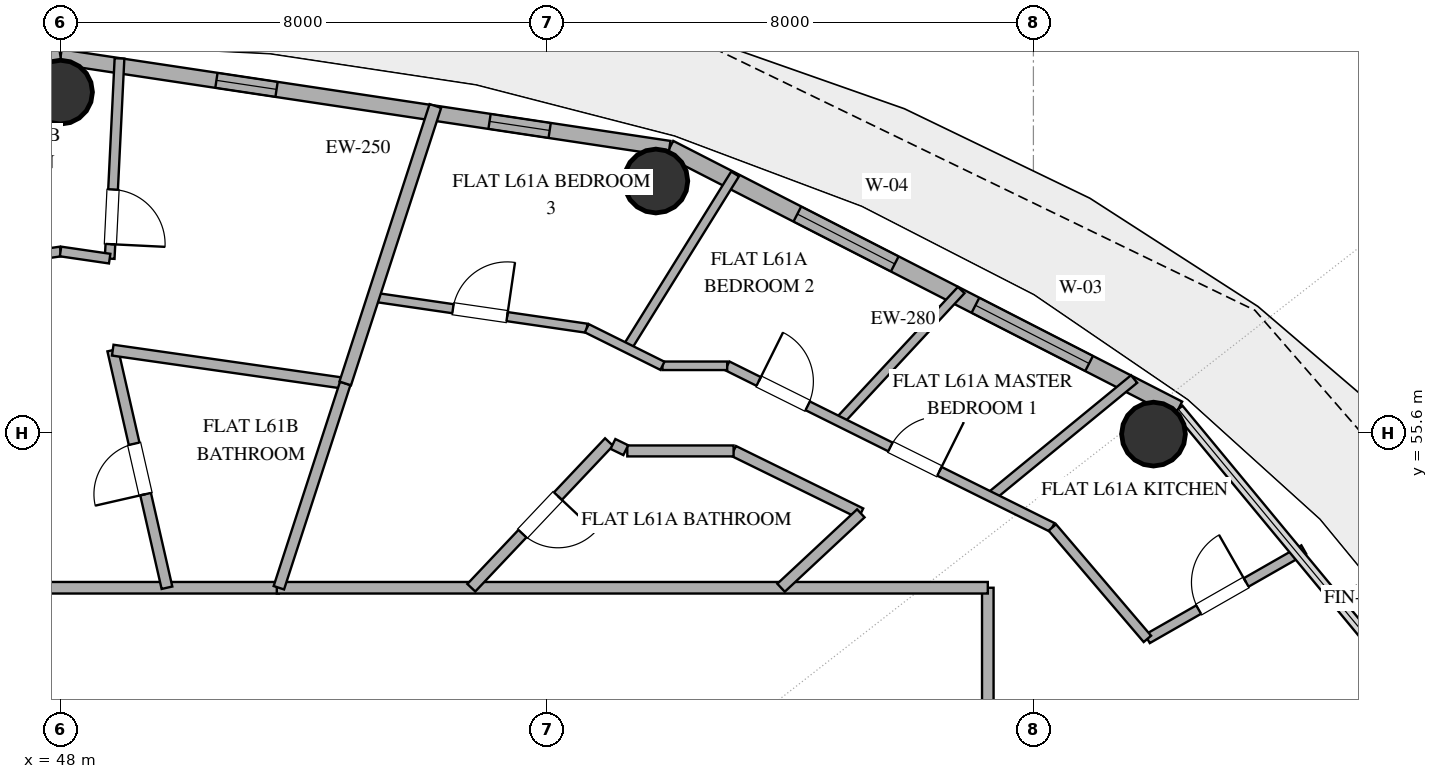
"""IFC4 building model, lengths in metres.
Left out: names, types, materials, properties, quantities, classifications, styles, units other than length and angle.
Written with IfcOpenShell. Run it as: python <this file> out.ifc"""

import sys

from ifc_helpers import new_model, si_unit, direction, frame, frame_2d, origin, origin_2d, place, context, subcontext, project, spatial, rectangle, hollow_circle, extrude, element, fill, save


model = new_model("IFC4")
c1 = context("Model", 3, precision=1e-05, world=origin(), true_north=direction((0.0, 1.0)))
c2 = subcontext(c1, "Body", "Model", "MODEL_VIEW")
j1 = project(units=[si_unit("LENGTHUNIT", "METRE"), si_unit("PLANEANGLEUNIT", "RADIAN")], contexts=[c1])
p1 = place(None, origin())
s1 = spatial("IfcSite", under=j1, at=p1, CompositionType="ELEMENT")
p2 = place(p1, origin())
s2 = spatial("IfcBuilding", under=s1, at=p2, CompositionType="ELEMENT")
p3 = place(p2, frame((0.0, 0.0, 238.8)))
s3 = spatial("IfcBuildingStorey", under=s2, at=p3, CompositionType="ELEMENT", Elevation=238.8)
for number, where, z_axis, x_axis in (
    (1, (65.975, 55.576, 0.0), (0.0, 0.0, 1.0), (1.0, 0.0, 0.0)),
    (2, (57.791, 59.739, 0.0), (0.0, 0.0, 1.0), (1.0, 0.0, 0.0)),
    (3, (48.0, 61.2, 0.0), (0.0, 0.0, 1.0), (1.0, 0.0, 0.0)),
):
    element("IfcColumn", number, at=place(p3, frame(where, z_axis=z_axis, x_axis=x_axis)), inside=s3, PredefinedType="COLUMN", context=c2, shape_type="SweptSolid", body=[
        extrude(hollow_circle(Radius=0.525, WallThickness=0.028, at=origin_2d()), origin(), (0.0, 0.0, 1.0), 3.36),
    ])
p4 = place(p3, frame((66.383, 55.987, 0.0), z_axis=(0.0, 0.0, 1.0), x_axis=(-0.890007394051, 0.455946091699, 0.0)))
e4 = element("IfcWall", 4, at=p4, inside=s3, PredefinedType="SOLIDWALL", context=c2, shape_type="SweptSolid", body=[
    extrude(rectangle(XDim=9.404, YDim=0.28, at=frame_2d((4.702, 0.0))), origin(), (0.0, 0.0, 1.0), 3.36),
])
p5 = place(p4, frame((1.648, 0.0, 0.85)))
e5 = element("IfcOpeningElement", 5, at=p5, cuts=e4, PredefinedType="OPENING", context=c2, shape_type="SweptSolid", body=[
    extrude(rectangle(XDim=2.1, YDim=2.2, at=frame_2d((1.05, 1.1))), frame((0.0, 0.15, 0.0), z_axis=(0.0, -1.0, 0.0), x_axis=(1.0, 0.0, 0.0)), (0.0, 0.0, 1.0), 0.3),
])
p6 = place(p4, frame((5.239, 0.0, 0.85)))
e6 = element("IfcOpeningElement", 6, at=p6, cuts=e4, PredefinedType="OPENING", context=c2, shape_type="SweptSolid", body=[
    extrude(rectangle(XDim=1.8, YDim=2.2, at=frame_2d((0.9, 1.1))), frame((0.0, 0.15, 0.0), z_axis=(0.0, -1.0, 0.0), x_axis=(1.0, 0.0, 0.0)), (0.0, 0.0, 1.0), 0.3),
])
p7 = place(p3, frame((58.013, 60.274, 0.0), z_axis=(0.0, 0.0, 1.0), x_axis=(-0.988882522213, 0.148698881169, 0.0)))
e7 = element("IfcWall", 7, at=p7, inside=s3, PredefinedType="SOLIDWALL", context=c2, shape_type="SweptSolid", body=[
    extrude(rectangle(XDim=10.125, YDim=0.25, at=frame_2d((5.062, 0.0))), origin(), (0.0, 0.0, 1.0), 3.36),
])
p8 = place(p7, frame((1.99, 0.0, 0.35)))
e8 = element("IfcOpeningElement", 8, at=p8, cuts=e7, PredefinedType="OPENING", context=c2, shape_type="SweptSolid", body=[
    extrude(rectangle(XDim=1.0, YDim=1.05, at=frame_2d((0.5, 0.525))), frame((0.0, 0.135, 0.0), z_axis=(0.0, -1.0, 0.0), x_axis=(1.0, 0.0, 0.0)), (0.0, 0.0, 1.0), 0.27),
])
p9 = place(p7, frame((6.533, 0.0, 1.42)))
e9 = element("IfcOpeningElement", 9, at=p9, cuts=e7, PredefinedType="OPENING", context=c2, shape_type="SweptSolid", body=[
    extrude(rectangle(XDim=1.0, YDim=1.05, at=frame_2d((0.5, 0.525))), frame((0.0, 0.135, 0.0), z_axis=(0.0, -1.0, 0.0), x_axis=(1.0, 0.0, 0.0)), (0.0, 0.0, 1.0), 0.27),
])
p10 = place(p3, frame((48.0, 61.78, 0.0), z_axis=(0.0, 0.0, 1.0), x_axis=(-0.988882522213, -0.148698881169, 0.0)))
e10 = element("IfcWall", 10, at=p10, inside=s3, PredefinedType="SOLIDWALL", context=c2, shape_type="SweptSolid", body=[
    extrude(rectangle(XDim=10.125, YDim=0.28, at=frame_2d((5.062, 0.0))), origin(), (0.0, 0.0, 1.0), 3.36),
])
p11 = place(p10, frame((2.694, 0.0, 0.85)))
e11 = element("IfcOpeningElement", 11, at=p11, cuts=e10, PredefinedType="OPENING", context=c2, shape_type="SweptSolid", body=[
    extrude(rectangle(XDim=1.65, YDim=2.0, at=frame_2d((0.825, 1.0))), frame((0.0, 0.15, 0.0), z_axis=(0.0, -1.0, 0.0), x_axis=(1.0, 0.0, 0.0)), (0.0, 0.0, 1.0), 0.3),
])
p12 = place(p10, frame((7.23, 0.0, 0.0)))
e12 = element("IfcOpeningElement", 12, at=p12, cuts=e10, PredefinedType="OPENING", context=c2, shape_type="SweptSolid", body=[
    extrude(rectangle(XDim=1.1, YDim=2.25, at=frame_2d((0.55, 1.125))), frame((0.0, 0.15, 0.0), z_axis=(0.0, -1.0, 0.0), x_axis=(1.0, 0.0, 0.0)), (0.0, 0.0, 1.0), 0.3),
])
p13 = place(p3, frame((32.75, 53.05, 0.0), z_axis=(0.0, 0.0, 1.0), x_axis=(1.0, 0.0, 0.0)))
e13 = element("IfcWall", 13, at=p13, inside=s3, PredefinedType="PARTITIONING", context=c2, shape_type="SweptSolid", body=[
    extrude(rectangle(XDim=18.84, YDim=0.19, at=frame_2d((9.42, 0.0))), origin(), (0.0, 0.0, 1.0), 2.72),
])
p14 = place(p13, frame((11.305, 0.0, 0.0)))
e14 = element("IfcOpeningElement", 14, at=p14, cuts=e13, PredefinedType="OPENING", context=c2, shape_type="SweptSolid", body=[
    extrude(rectangle(XDim=1.0, YDim=2.2, at=frame_2d((0.5, 1.1))), frame((0.0, 0.105, 0.0), z_axis=(0.0, -1.0, 0.0), x_axis=(1.0, 0.0, 0.0)), (0.0, 0.0, 1.0), 0.21),
])
p15 = place(p13, frame((2.829, 0.0, 0.0)))
e15 = element("IfcOpeningElement", 15, at=p15, cuts=e13, PredefinedType="OPENING", context=c2, shape_type="SweptSolid", body=[
    extrude(rectangle(XDim=1.0, YDim=2.2, at=frame_2d((0.5, 1.1))), frame((0.0, 0.105, 0.0), z_axis=(0.0, -1.0, 0.0), x_axis=(1.0, 0.0, 0.0)), (0.0, 0.0, 1.0), 0.21),
])
p16 = place(p3, frame((63.25, 53.05, 0.0), z_axis=(0.0, 0.0, 1.0), x_axis=(0.0, -1.0, 0.0)))
e16 = element("IfcWall", 16, at=p16, inside=s3, PredefinedType="PARTITIONING", context=c2, shape_type="SweptSolid", body=[
    extrude(rectangle(XDim=16.335, YDim=0.19, at=frame_2d((8.167, 0.0))), origin(), (0.0, 0.0, 1.0), 2.72),
])
p17 = place(p16, frame((3.14, 0.0, 0.0)))
e17 = element("IfcOpeningElement", 17, at=p17, cuts=e16, PredefinedType="OPENING", context=c2, shape_type="SweptSolid", body=[
    extrude(rectangle(XDim=1.0, YDim=2.2, at=frame_2d((0.5, 1.1))), frame((0.0, 0.105, 0.0), z_axis=(0.0, -1.0, 0.0), x_axis=(1.0, 0.0, 0.0)), (0.0, 0.0, 1.0), 0.21),
])
p18 = place(p16, frame((10.111, 0.0, 0.0)))
e18 = element("IfcOpeningElement", 18, at=p18, cuts=e16, PredefinedType="OPENING", context=c2, shape_type="SweptSolid", body=[
    extrude(rectangle(XDim=1.0, YDim=2.2, at=frame_2d((0.5, 1.1))), frame((0.0, 0.105, 0.0), z_axis=(0.0, -1.0, 0.0), x_axis=(1.0, 0.0, 0.0)), (0.0, 0.0, 1.0), 0.21),
])
p19 = place(p3, frame((51.557, 53.05, 0.0), z_axis=(0.0, 0.0, 1.0), x_axis=(1.0, 0.0, 0.0)))
e19 = element("IfcWall", 19, at=p19, inside=s3, PredefinedType="PARTITIONING", context=c2, shape_type="SweptSolid", body=[
    extrude(rectangle(XDim=11.693, YDim=0.19, at=frame_2d((5.847, 0.0))), origin(), (0.0, 0.0, 1.0), 2.72),
])
p20 = place(p3, frame((49.75, 53.05, 0.0), z_axis=(0.0, 0.0, 1.0), x_axis=(-0.222474116201, 0.974938596846, 0.0)))
e20 = element("IfcWall", 20, at=p20, inside=s3, PredefinedType="PLUMBINGWALL", context=c2, shape_type="SweptSolid", body=[
    extrude(rectangle(XDim=4.008, YDim=0.18, at=frame_2d((2.004, 0.0))), origin(), (0.0, 0.0, 1.0), 2.72),
])
p21 = place(p20, frame((1.579, 0.0, 0.0)))
e21 = element("IfcOpeningElement", 21, at=p21, cuts=e20, PredefinedType="OPENING", context=c2, shape_type="SweptSolid", body=[
    extrude(rectangle(XDim=0.85, YDim=2.1, at=frame_2d((0.425, 1.05))), frame((0.0, 0.1, 0.0), z_axis=(0.0, -1.0, 0.0), x_axis=(1.0, 0.0, 0.0)), (0.0, 0.0, 1.0), 0.2),
])
p22 = place(p3, frame((48.859, 56.957, 0.0), z_axis=(0.0, 0.0, 1.0), x_axis=(0.989916598229, -0.141651433282, 0.0)))
e22 = element("IfcWall", 22, at=p22, inside=s3, PredefinedType="PLUMBINGWALL", context=c2, shape_type="SweptSolid", body=[
    extrude(rectangle(XDim=3.863, YDim=0.18, at=frame_2d((1.931, 0.0))), origin(), (0.0, 0.0, 1.0), 2.72),
])
p23 = place(p3, frame((53.144, 57.83, 0.0), z_axis=(0.0, 0.0, 1.0), x_axis=(0.98952683964, -0.144348999414, 0.0)))
e23 = element("IfcWall", 23, at=p23, inside=s3, PredefinedType="PARTITIONING", context=c2, shape_type="SweptSolid", body=[
    extrude(rectangle(XDim=3.548, YDim=0.15, at=frame_2d((1.774, 0.0))), origin(), (0.0, 0.0, 1.0), 2.72),
])
p24 = place(p23, frame((1.324, 0.0, 0.0)))
e24 = element("IfcOpeningElement", 24, at=p24, cuts=e23, PredefinedType="OPENING", context=c2, shape_type="SweptSolid", body=[
    extrude(rectangle(XDim=0.9, YDim=2.1, at=frame_2d((0.45, 1.05))), frame((0.0, 0.085, 0.0), z_axis=(0.0, -1.0, 0.0), x_axis=(1.0, 0.0, 0.0)), (0.0, 0.0, 1.0), 0.17),
])
p25 = place(p3, frame((52.682, 56.41, 0.0), z_axis=(0.0, 0.0, 1.0), x_axis=(-0.309025133622, -0.951053871655, 0.0)))
e25 = element("IfcWall", 25, at=p25, inside=s3, PredefinedType="PLUMBINGWALL", context=c2, shape_type="SweptSolid", body=[
    extrude(rectangle(XDim=3.533, YDim=0.18, at=frame_2d((1.767, 0.0))), origin(), (0.0, 0.0, 1.0), 2.72),
])
p26 = place(p3, frame((57.314, 56.99, 0.0), z_axis=(0.0, 0.0, 1.0), x_axis=(0.527732275503, 0.849410763643, 0.0)))
e26 = element("IfcWall", 26, at=p26, inside=s3, PredefinedType="PARTITIONING", context=c2, shape_type="SweptSolid", body=[
    extrude(rectangle(XDim=3.372, YDim=0.15, at=frame_2d((1.686, 0.0))), origin(), (0.0, 0.0, 1.0), 2.72),
])
p27 = place(p3, frame((54.165, 60.973, 0.0), z_axis=(0.0, 0.0, 1.0), x_axis=(-0.309012424199, -0.951058001223, 0.0)))
e27 = element("IfcWall", 27, at=p27, inside=s3, PredefinedType="PARTITIONING", context=c2, shape_type="SweptSolid", body=[
    extrude(rectangle(XDim=4.797, YDim=0.2, at=frame_2d((2.399, 0.0))), origin(), (0.0, 0.0, 1.0), 2.72),
])
p28 = place(p3, frame((57.021, 55.446, 0.0), z_axis=(0.0, 0.0, 1.0), x_axis=(-0.686947406922, -0.726707135044, 0.0)))
e28 = element("IfcWall", 28, at=p28, inside=s3, PredefinedType="PLUMBINGWALL", context=c2, shape_type="SweptSolid", body=[
    extrude(rectangle(XDim=3.297, YDim=0.18, at=frame_2d((1.649, 0.0))), origin(), (0.0, 0.0, 1.0), 2.72),
])
p29 = place(p28, frame((1.224, 0.0, 0.0)))
e29 = element("IfcOpeningElement", 29, at=p29, cuts=e28, PredefinedType="OPENING", context=c2, shape_type="SweptSolid", body=[
    extrude(rectangle(XDim=0.85, YDim=2.1, at=frame_2d((0.425, 1.05))), frame((0.0, 0.1, 0.0), z_axis=(0.0, -1.0, 0.0), x_axis=(1.0, 0.0, 0.0)), (0.0, 0.0, 1.0), 0.2),
])
p30 = place(p3, frame((48.969, 61.755, 0.0), z_axis=(0.0, 0.0, 1.0), x_axis=(-0.04902528139, -0.998797537935, 0.0)))
e30 = element("IfcWall", 30, at=p30, inside=s3, PredefinedType="PLUMBINGWALL", context=c2, shape_type="SweptSolid", body=[
    extrude(rectangle(XDim=3.297, YDim=0.16, at=frame_2d((1.648, 0.0))), origin(), (0.0, 0.0, 1.0), 2.72),
])
p31 = place(p30, frame((2.158, 0.0, 0.0)))
e31 = element("IfcOpeningElement", 31, at=p31, cuts=e30, PredefinedType="OPENING", context=c2, shape_type="SweptSolid", body=[
    extrude(rectangle(XDim=0.9, YDim=2.1, at=frame_2d((0.45, 1.05))), frame((0.0, 0.09, 0.0), z_axis=(0.0, -1.0, 0.0), x_axis=(1.0, 0.0, 0.0)), (0.0, 0.0, 1.0), 0.18),
])
p32 = place(p3, frame((39.345, 57.318, 0.0), z_axis=(0.0, 0.0, 1.0), x_axis=(0.989540121389, 0.144257922351, 0.0)))
e32 = element("IfcWall", 32, at=p32, inside=s3, PredefinedType="PLUMBINGWALL", context=c2, shape_type="SweptSolid", body=[
    extrude(rectangle(XDim=8.746, YDim=0.16, at=frame_2d((4.373, 0.0))), origin(), (0.0, 0.0, 1.0), 2.72),
])
p33 = place(p32, frame((2.686, 0.0, 0.0)))
e33 = element("IfcOpeningElement", 33, at=p33, cuts=e32, PredefinedType="OPENING", context=c2, shape_type="SweptSolid", body=[
    extrude(rectangle(XDim=0.9, YDim=2.1, at=frame_2d((0.45, 1.05))), frame((0.0, 0.09, 0.0), z_axis=(0.0, -1.0, 0.0), x_axis=(1.0, 0.0, 0.0)), (0.0, 0.0, 1.0), 0.18),
])
p34 = place(p32, frame((5.349, 0.0, 0.0)))
e34 = element("IfcOpeningElement", 34, at=p34, cuts=e32, PredefinedType="OPENING", context=c2, shape_type="SweptSolid", body=[
    extrude(rectangle(XDim=0.9, YDim=2.1, at=frame_2d((0.45, 1.05))), frame((0.0, 0.09, 0.0), z_axis=(0.0, -1.0, 0.0), x_axis=(1.0, 0.0, 0.0)), (0.0, 0.0, 1.0), 0.18),
])
p35 = place(p32, frame((0.341, 0.0, 0.0)))
e35 = element("IfcOpeningElement", 35, at=p35, cuts=e32, PredefinedType="OPENING", context=c2, shape_type="SweptSolid", body=[
    extrude(rectangle(XDim=0.9, YDim=2.1, at=frame_2d((0.45, 1.05))), frame((0.0, 0.09, 0.0), z_axis=(0.0, -1.0, 0.0), x_axis=(1.0, 0.0, 0.0)), (0.0, 0.0, 1.0), 0.18),
])
p36 = place(p3, frame((63.296, 54.547, 0.0), z_axis=(0.0, 0.0, 1.0), x_axis=(0.773154828325, 0.634217321931, 0.0)))
e36 = element("IfcWall", 36, at=p36, inside=s3, PredefinedType="PLUMBINGWALL", context=c2, shape_type="SweptSolid", body=[
    extrude(rectangle(XDim=3.052, YDim=0.16, at=frame_2d((1.526, 0.0))), origin(), (0.0, 0.0, 1.0), 2.72),
])
p37 = place(p3, frame((65.875, 52.209, 0.0), z_axis=(0.0, 0.0, 1.0), x_axis=(0.868349640853, 0.495952519128, 0.0)))
e37 = element("IfcWall", 37, at=p37, inside=s3, PredefinedType="PLUMBINGWALL", context=c2, shape_type="SweptSolid", body=[
    extrude(rectangle(XDim=2.962, YDim=0.16, at=frame_2d((1.481, 0.0))), origin(), (0.0, 0.0, 1.0), 2.72),
])
p38 = place(p37, frame((0.971, 0.0, 0.0)))
e38 = element("IfcOpeningElement", 38, at=p38, cuts=e37, PredefinedType="OPENING", context=c2, shape_type="SweptSolid", body=[
    extrude(rectangle(XDim=0.9, YDim=2.1, at=frame_2d((0.45, 1.05))), frame((0.0, 0.09, 0.0), z_axis=(0.0, -1.0, 0.0), x_axis=(1.0, 0.0, 0.0)), (0.0, 0.0, 1.0), 0.18),
])
p39 = place(p3, frame((62.812, 57.945, 0.0), z_axis=(0.0, 0.0, 1.0), x_axis=(-0.680590804007, -0.732663741085, 0.0)))
e39 = element("IfcWall", 39, at=p39, inside=s3, PredefinedType="PARTITIONING", context=c2, shape_type="SweptSolid", body=[
    extrude(rectangle(XDim=2.949, YDim=0.15, at=frame_2d((1.475, 0.0))), origin(), (0.0, 0.0, 1.0), 2.72),
])
p40 = place(p3, frame((58.964, 56.7, 0.0), z_axis=(0.0, 0.0, 1.0), x_axis=(0.895471406875, -0.445119039661, 0.0)))
e40 = element("IfcWall", 40, at=p40, inside=s3, PredefinedType="PLUMBINGWALL", context=c2, shape_type="SweptSolid", body=[
    extrude(rectangle(XDim=5.971, YDim=0.16, at=frame_2d((2.986, 0.0))), origin(), (0.0, 0.0, 1.0), 2.72),
])
p41 = place(p40, frame((2.998, 0.0, 0.0)))
e41 = element("IfcOpeningElement", 41, at=p41, cuts=e40, PredefinedType="OPENING", context=c2, shape_type="SweptSolid", body=[
    extrude(rectangle(XDim=0.9, YDim=2.1, at=frame_2d((0.45, 1.05))), frame((0.0, 0.09, 0.0), z_axis=(0.0, -1.0, 0.0), x_axis=(1.0, 0.0, 0.0)), (0.0, 0.0, 1.0), 0.18),
])
p42 = place(p40, frame((0.578, 0.0, 0.0)))
e42 = element("IfcOpeningElement", 42, at=p42, cuts=e40, PredefinedType="OPENING", context=c2, shape_type="SweptSolid", body=[
    extrude(rectangle(XDim=0.9, YDim=2.1, at=frame_2d((0.45, 1.05))), frame((0.0, 0.09, 0.0), z_axis=(0.0, -1.0, 0.0), x_axis=(1.0, 0.0, 0.0)), (0.0, 0.0, 1.0), 0.18),
])
p43 = place(p3, frame((64.311, 54.042, 0.0), z_axis=(0.0, 0.0, 1.0), x_axis=(0.648953507232, -0.760828065631, 0.0)))
e43 = element("IfcWall", 43, at=p43, inside=s3, PredefinedType="PLUMBINGWALL", context=c2, shape_type="SweptSolid", body=[
    extrude(rectangle(XDim=2.409, YDim=0.16, at=frame_2d((1.205, 0.0))), origin(), (0.0, 0.0, 1.0), 2.72),
])
p44 = place(p3, frame((61.162, 54.273, 0.0), z_axis=(0.0, 0.0, 1.0), x_axis=(-0.897774561906, 0.440455259925, 0.0)))
e44 = element("IfcWall", 44, at=p44, inside=s3, PredefinedType="PLUMBINGWALL", context=c2, shape_type="SweptSolid", body=[
    extrude(rectangle(XDim=2.331, YDim=0.18, at=frame_2d((1.166, 0.0))), origin(), (0.0, 0.0, 1.0), 2.72),
])
p45 = place(p3, frame((59.85, 53.05, 0.0), z_axis=(0.0, 0.0, 1.0), x_axis=(0.731376514485, 0.681973895438, 0.0)))
e45 = element("IfcWall", 45, at=p45, inside=s3, PredefinedType="PLUMBINGWALL", context=c2, shape_type="SweptSolid", body=[
    extrude(rectangle(XDim=1.794, YDim=0.18, at=frame_2d((0.897, 0.0))), origin(), (0.0, 0.0, 1.0), 2.72),
])
p46 = place(p3, frame((59.069, 55.3, 0.0), z_axis=(0.0, 0.0, 1.0), x_axis=(-1.0, 0.0, 0.0)))
e46 = element("IfcWall", 46, at=p46, inside=s3, PredefinedType="PLUMBINGWALL", context=c2, shape_type="SweptSolid", body=[
    extrude(rectangle(XDim=1.748, YDim=0.18, at=frame_2d((0.874, 0.0))), origin(), (0.0, 0.0, 1.0), 2.72),
])
p47 = place(p3, frame((58.964, 56.7, 0.0), z_axis=(0.0, 0.0, 1.0), x_axis=(-1.0, 0.0, 0.0)))
e47 = element("IfcWall", 47, at=p47, inside=s3, PredefinedType="PARTITIONING", context=c2, shape_type="SweptSolid", body=[
    extrude(rectangle(XDim=1.065, YDim=0.14, at=frame_2d((0.533, 0.0))), origin(), (0.0, 0.0, 1.0), 2.72),
])
p48 = place(p3, frame((48.808, 58.462, 0.0), z_axis=(0.0, 0.0, 1.0), x_axis=(-0.989514290885, 0.144434996222, 0.0)))
e48 = element("IfcWall", 48, at=p48, inside=s3, PredefinedType="PLUMBINGWALL", context=c2, shape_type="SweptSolid", body=[
    extrude(rectangle(XDim=0.816, YDim=0.16, at=frame_2d((0.408, 0.0))), origin(), (0.0, 0.0, 1.0), 2.72),
])
p49 = place(p3, frame((56.655, 57.318, 0.0), z_axis=(0.0, 0.0, 1.0), x_axis=(0.895584310315, -0.444891833053, 0.0)))
e49 = element("IfcWall", 49, at=p49, inside=s3, PredefinedType="PARTITIONING", context=c2, shape_type="SweptSolid", body=[
    extrude(rectangle(XDim=1.389, YDim=0.15, at=frame_2d((0.694, 0.0))), origin(), (0.0, 0.0, 1.0), 2.72),
])
p50 = place(p3, frame((57.296, 55.312, 0.0), z_axis=(0.0, 0.0, 1.0), x_axis=(-0.898768445644, 0.438423632021, 0.0)))
e50 = element("IfcWall", 50, at=p50, inside=s3, PredefinedType="PLUMBINGWALL", context=c2, shape_type="SweptSolid", body=[
    extrude(rectangle(XDim=0.234, YDim=0.18, at=frame_2d((0.117, 0.0))), origin(), (0.0, 0.0, 1.0), 2.72),
])
p51 = place(p5, origin())
e51 = element("IfcWindow", 51, at=p51, inside=s3, PartitioningType="SINGLE_PANEL", PredefinedType="WINDOW", context=c2, shape_type="SweptSolid", body=[
    extrude(rectangle(XDim=2.1, YDim=2.2, at=frame_2d((1.05, 1.1))), frame((0.0, 0.03, 0.0), z_axis=(0.0, -1.0, 0.0), x_axis=(1.0, 0.0, 0.0)), (0.0, 0.0, 1.0), 0.06),
])
fill(e5, e51)
p52 = place(p6, origin())
e52 = element("IfcWindow", 52, at=p52, inside=s3, PartitioningType="SINGLE_PANEL", PredefinedType="WINDOW", context=c2, shape_type="SweptSolid", body=[
    extrude(rectangle(XDim=1.8, YDim=2.2, at=frame_2d((0.9, 1.1))), frame((0.0, 0.03, 0.0), z_axis=(0.0, -1.0, 0.0), x_axis=(1.0, 0.0, 0.0)), (0.0, 0.0, 1.0), 0.06),
])
fill(e6, e52)
p53 = place(p8, origin())
e53 = element("IfcWindow", 53, at=p53, inside=s3, PartitioningType="SINGLE_PANEL", PredefinedType="WINDOW", context=c2, shape_type="SweptSolid", body=[
    extrude(rectangle(XDim=1.0, YDim=1.05, at=frame_2d((0.5, 0.525))), frame((0.0, 0.03, 0.0), z_axis=(0.0, -1.0, 0.0), x_axis=(1.0, 0.0, 0.0)), (0.0, 0.0, 1.0), 0.06),
])
fill(e8, e53)
p54 = place(p9, origin())
e54 = element("IfcWindow", 54, at=p54, inside=s3, PartitioningType="SINGLE_PANEL", PredefinedType="WINDOW", context=c2, shape_type="SweptSolid", body=[
    extrude(rectangle(XDim=1.0, YDim=1.05, at=frame_2d((0.5, 0.525))), frame((0.0, 0.03, 0.0), z_axis=(0.0, -1.0, 0.0), x_axis=(1.0, 0.0, 0.0)), (0.0, 0.0, 1.0), 0.06),
])
fill(e9, e54)
p55 = place(p21, origin())
e55 = element("IfcDoor", 55, at=p55, inside=s3, OperationType="SINGLE_SWING_LEFT", PredefinedType="DOOR", context=c2, shape_type="SweptSolid", body=[
    extrude(rectangle(XDim=0.85, YDim=2.1, at=frame_2d((0.425, 1.05))), frame((0.0, 0.025, 0.0), z_axis=(0.0, -1.0, 0.0), x_axis=(1.0, 0.0, 0.0)), (0.0, 0.0, 1.0), 0.05),
])
fill(e21, e55)
p56 = place(p24, origin())
e56 = element("IfcDoor", 56, at=p56, inside=s3, OperationType="SINGLE_SWING_RIGHT", PredefinedType="DOOR", context=c2, shape_type="SweptSolid", body=[
    extrude(rectangle(XDim=0.9, YDim=2.1, at=frame_2d((0.45, 1.05))), frame((0.0, 0.025, 0.0), z_axis=(0.0, -1.0, 0.0), x_axis=(1.0, 0.0, 0.0)), (0.0, 0.0, 1.0), 0.05),
])
fill(e24, e56)
p57 = place(p29, origin())
e57 = element("IfcDoor", 57, at=p57, inside=s3, OperationType="SINGLE_SWING_LEFT", PredefinedType="DOOR", context=c2, shape_type="SweptSolid", body=[
    extrude(rectangle(XDim=0.85, YDim=2.1, at=frame_2d((0.425, 1.05))), frame((0.0, 0.025, 0.0), z_axis=(0.0, -1.0, 0.0), x_axis=(1.0, 0.0, 0.0)), (0.0, 0.0, 1.0), 0.05),
])
fill(e29, e57)
p58 = place(p31, origin())
e58 = element("IfcDoor", 58, at=p58, inside=s3, OperationType="SINGLE_SWING_RIGHT", PredefinedType="DOOR", context=c2, shape_type="SweptSolid", body=[
    extrude(rectangle(XDim=0.9, YDim=2.1, at=frame_2d((0.45, 1.05))), frame((0.0, 0.025, 0.0), z_axis=(0.0, -1.0, 0.0), x_axis=(1.0, 0.0, 0.0)), (0.0, 0.0, 1.0), 0.05),
])
fill(e31, e58)
p59 = place(p38, origin())
e59 = element("IfcDoor", 59, at=p59, inside=s3, OperationType="SINGLE_SWING_RIGHT", PredefinedType="DOOR", context=c2, shape_type="SweptSolid", body=[
    extrude(rectangle(XDim=0.9, YDim=2.1, at=frame_2d((0.45, 1.05))), frame((0.0, 0.025, 0.0), z_axis=(0.0, -1.0, 0.0), x_axis=(1.0, 0.0, 0.0)), (0.0, 0.0, 1.0), 0.05),
])
fill(e38, e59)
p60 = place(p41, origin())
e60 = element("IfcDoor", 60, at=p60, inside=s3, OperationType="SINGLE_SWING_RIGHT", PredefinedType="DOOR", context=c2, shape_type="SweptSolid", body=[
    extrude(rectangle(XDim=0.9, YDim=2.1, at=frame_2d((0.45, 1.05))), frame((0.0, 0.025, 0.0), z_axis=(0.0, -1.0, 0.0), x_axis=(1.0, 0.0, 0.0)), (0.0, 0.0, 1.0), 0.05),
])
fill(e41, e60)
p61 = place(p42, origin())
e61 = element("IfcDoor", 61, at=p61, inside=s3, OperationType="SINGLE_SWING_LEFT", PredefinedType="DOOR", context=c2, shape_type="SweptSolid", body=[
    extrude(rectangle(XDim=0.9, YDim=2.1, at=frame_2d((0.45, 1.05))), frame((0.0, 0.025, 0.0), z_axis=(0.0, -1.0, 0.0), x_axis=(1.0, 0.0, 0.0)), (0.0, 0.0, 1.0), 0.05),
])
fill(e42, e61)
save(model, sys.argv[1])
